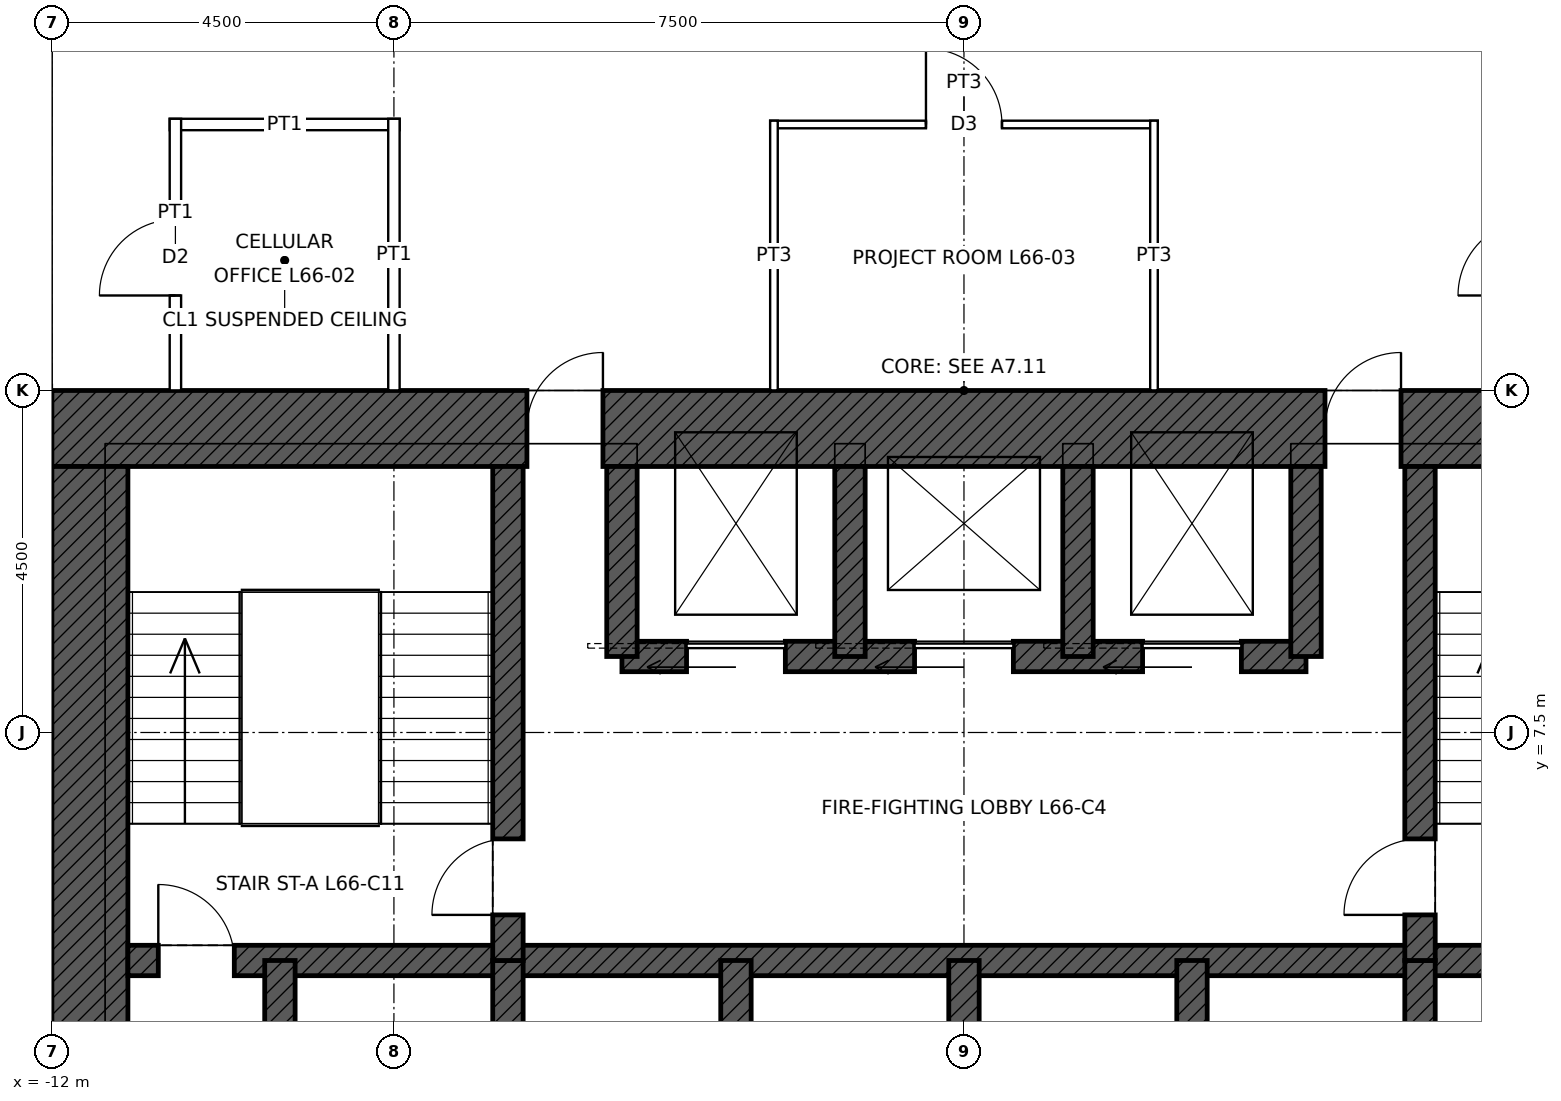
"""IFC4 building model, lengths in metres.
Left out: names, types, materials, properties, quantities, classifications, styles, units other than length and angle.
Written with IfcOpenShell. Run it as: python <this file> out.ifc"""

import sys

from ifc_helpers import new_model, si_unit, direction, frame, frame_2d, origin, place, context, subcontext, project, spatial, rectangle, extrude, element, fill, save


model = new_model("IFC4")
c1 = context("Model", 3, precision=1e-05, world=origin(), true_north=direction((0.0, 1.0)))
c2 = subcontext(c1, "Body", "Model", "MODEL_VIEW")
j1 = project(units=[si_unit("LENGTHUNIT", "METRE"), si_unit("PLANEANGLEUNIT", "RADIAN")], contexts=[c1])
p1 = place(None, origin())
s1 = spatial("IfcSite", under=j1, at=p1, CompositionType="ELEMENT")
p2 = place(p1, origin())
s2 = spatial("IfcBuilding", under=s1, at=p2, CompositionType="ELEMENT")
p3 = place(p2, frame((0.0, 0.0, 299.9)))
s3 = spatial("IfcBuildingStorey", under=s2, at=p3, CompositionType="ELEMENT", Elevation=299.9)
p4 = place(p3, frame((-12.0, 11.5, 0.0), z_axis=(0.0, 0.0, 1.0), x_axis=(1.0, 0.0, 0.0)))
e1 = element("IfcWall", 1, at=p4, inside=s3, PredefinedType="SHEAR", context=c2, shape_type="SweptSolid", body=[
    extrude(rectangle(XDim=24.0, YDim=1.0, at=frame_2d((12.0, 0.0))), origin(), (0.0, 0.0, 1.0), 4.0),
])
p5 = place(p4, frame((6.25, 0.0, 0.0)))
e2 = element("IfcOpeningElement", 2, at=p5, cuts=e1, PredefinedType="OPENING", context=c2, shape_type="SweptSolid", body=[
    extrude(rectangle(XDim=1.0, YDim=2.4, at=frame_2d((0.5, 1.2))), frame((0.0, 0.51, 0.0), z_axis=(0.0, -1.0, 0.0), x_axis=(1.0, 0.0, 0.0)), (0.0, 0.0, 1.0), 1.02),
])
p6 = place(p4, frame((16.75, 0.0, 0.0)))
e3 = element("IfcOpeningElement", 3, at=p6, cuts=e1, PredefinedType="OPENING", context=c2, shape_type="SweptSolid", body=[
    extrude(rectangle(XDim=1.0, YDim=2.4, at=frame_2d((0.5, 1.2))), frame((0.0, 0.51, 0.0), z_axis=(0.0, -1.0, 0.0), x_axis=(1.0, 0.0, 0.0)), (0.0, 0.0, 1.0), 1.02),
])
p7 = place(p3, frame((-11.5, -11.0, 0.0), z_axis=(0.0, 0.0, 1.0), x_axis=(0.0, 1.0, 0.0)))
e4 = element("IfcWall", 4, at=p7, inside=s3, PredefinedType="SHEAR", context=c2, shape_type="SweptSolid", body=[
    extrude(rectangle(XDim=22.0, YDim=1.0, at=frame_2d((11.0, 0.0))), origin(), (0.0, 0.0, 1.0), 4.0),
])
p8 = place(p7, frame((10.5, 0.0, 0.0)))
e5 = element("IfcOpeningElement", 5, at=p8, cuts=e4, PredefinedType="OPENING", context=c2, shape_type="SweptSolid", body=[
    extrude(rectangle(XDim=1.0, YDim=2.4, at=frame_2d((0.5, 1.2))), frame((0.0, 0.51, 0.0), z_axis=(0.0, -1.0, 0.0), x_axis=(1.0, 0.0, 0.0)), (0.0, 0.0, 1.0), 1.02),
])
p9 = place(p3, frame((-11.0, 4.5, 0.0), z_axis=(0.0, 0.0, 1.0), x_axis=(1.0, 0.0, 0.0)))
e6 = element("IfcWall", 6, at=p9, inside=s3, PredefinedType="SHEAR", context=c2, shape_type="SweptSolid", body=[
    extrude(rectangle(XDim=22.0, YDim=0.4, at=frame_2d((11.0, 0.0))), origin(), (0.0, 0.0, 1.0), 4.0),
])
p10 = place(p9, frame((0.4, 0.0, 0.0)))
e7 = element("IfcOpeningElement", 7, at=p10, cuts=e6, PredefinedType="OPENING", context=c2, shape_type="SweptSolid", body=[
    extrude(rectangle(XDim=1.0, YDim=2.1, at=frame_2d((0.5, 1.05))), frame((0.0, 0.21, 0.0), z_axis=(0.0, -1.0, 0.0), x_axis=(1.0, 0.0, 0.0)), (0.0, 0.0, 1.0), 0.42),
])
p11 = place(p9, frame((20.6, 0.0, 0.0)))
e8 = element("IfcOpeningElement", 8, at=p11, cuts=e6, PredefinedType="OPENING", context=c2, shape_type="SweptSolid", body=[
    extrude(rectangle(XDim=1.0, YDim=2.1, at=frame_2d((0.5, 1.05))), frame((0.0, 0.21, 0.0), z_axis=(0.0, -1.0, 0.0), x_axis=(1.0, 0.0, 0.0)), (0.0, 0.0, 1.0), 0.42),
])
p12 = place(p3, frame((-4.5, 8.5, 0.0), z_axis=(0.0, 0.0, 1.0), x_axis=(1.0, 0.0, 0.0)))
e9 = element("IfcWall", 9, at=p12, inside=s3, PredefinedType="SHEAR", context=c2, shape_type="SweptSolid", body=[
    extrude(rectangle(XDim=9.0, YDim=0.4, at=frame_2d((4.5, 0.0))), origin(), (0.0, 0.0, 1.0), 4.0),
])
p13 = place(p12, frame((0.85, 0.0, 0.0)))
e10 = element("IfcOpeningElement", 10, at=p13, cuts=e9, PredefinedType="OPENING", context=c2, shape_type="SweptSolid", body=[
    extrude(rectangle(XDim=1.3, YDim=2.4, at=frame_2d((0.65, 1.2))), frame((0.0, 0.21, 0.0), z_axis=(0.0, -1.0, 0.0), x_axis=(1.0, 0.0, 0.0)), (0.0, 0.0, 1.0), 0.42),
])
p14 = place(p12, frame((6.85, 0.0, 0.0)))
e11 = element("IfcOpeningElement", 11, at=p14, cuts=e9, PredefinedType="OPENING", context=c2, shape_type="SweptSolid", body=[
    extrude(rectangle(XDim=1.3, YDim=2.4, at=frame_2d((0.65, 1.2))), frame((0.0, 0.21, 0.0), z_axis=(0.0, -1.0, 0.0), x_axis=(1.0, 0.0, 0.0)), (0.0, 0.0, 1.0), 0.42),
])
p15 = place(p12, frame((3.85, 0.0, 0.0)))
e12 = element("IfcOpeningElement", 12, at=p15, cuts=e9, PredefinedType="OPENING", context=c2, shape_type="SweptSolid", body=[
    extrude(rectangle(XDim=1.3, YDim=2.4, at=frame_2d((0.65, 1.2))), frame((0.0, 0.21, 0.0), z_axis=(0.0, -1.0, 0.0), x_axis=(1.0, 0.0, 0.0)), (0.0, 0.0, 1.0), 0.42),
])
for number, where, z_axis, x_axis in (
    (13, (-9.0, 1.5, 0.0), (0.0, 0.0, 1.0), (0.0, 1.0, 0.0)),
    (14, (-6.0, 1.5, 0.0), (0.0, 0.0, 1.0), (0.0, 1.0, 0.0)),
    (15, (-3.0, 1.5, 0.0), (0.0, 0.0, 1.0), (0.0, 1.0, 0.0)),
    (16, (0.0, 1.5, 0.0), (0.0, 0.0, 1.0), (0.0, 1.0, 0.0)),
    (17, (3.0, 1.5, 0.0), (0.0, 0.0, 1.0), (0.0, 1.0, 0.0)),
    (18, (6.0, 1.5, 0.0), (0.0, 0.0, 1.0), (0.0, 1.0, 0.0)),
):
    element("IfcWall", number, at=place(p3, frame(where, z_axis=z_axis, x_axis=x_axis)), inside=s3, PredefinedType="SHEAR", context=c2, shape_type="SweptSolid", body=[
        extrude(rectangle(XDim=3.0, YDim=0.4, at=frame_2d((1.5, 0.0))), origin(), (0.0, 0.0, 1.0), 4.0),
    ])
p16 = place(p3, frame((-6.0, 4.5, 0.0), z_axis=(0.0, 0.0, 1.0), x_axis=(0.0, 1.0, 0.0)))
e19 = element("IfcWall", 19, at=p16, inside=s3, PredefinedType="SHEAR", context=c2, shape_type="SweptSolid", body=[
    extrude(rectangle(XDim=6.5, YDim=0.4, at=frame_2d((3.25, 0.0))), origin(), (0.0, 0.0, 1.0), 4.0),
])
p17 = place(p16, frame((0.6, 0.0, 0.0)))
e20 = element("IfcOpeningElement", 20, at=p17, cuts=e19, PredefinedType="OPENING", context=c2, shape_type="SweptSolid", body=[
    extrude(rectangle(XDim=1.0, YDim=2.1, at=frame_2d((0.5, 1.05))), frame((0.0, 0.21, 0.0), z_axis=(0.0, -1.0, 0.0), x_axis=(1.0, 0.0, 0.0)), (0.0, 0.0, 1.0), 0.42),
])
p18 = place(p3, frame((6.0, 4.5, 0.0), z_axis=(0.0, 0.0, 1.0), x_axis=(0.0, 1.0, 0.0)))
e21 = element("IfcWall", 21, at=p18, inside=s3, PredefinedType="SHEAR", context=c2, shape_type="SweptSolid", body=[
    extrude(rectangle(XDim=6.5, YDim=0.4, at=frame_2d((3.25, 0.0))), origin(), (0.0, 0.0, 1.0), 4.0),
])
p19 = place(p18, frame((0.6, 0.0, 0.0)))
e22 = element("IfcOpeningElement", 22, at=p19, cuts=e21, PredefinedType="OPENING", context=c2, shape_type="SweptSolid", body=[
    extrude(rectangle(XDim=1.0, YDim=2.1, at=frame_2d((0.5, 1.05))), frame((0.0, 0.21, 0.0), z_axis=(0.0, -1.0, 0.0), x_axis=(1.0, 0.0, 0.0)), (0.0, 0.0, 1.0), 0.42),
])
for number, where, z_axis, x_axis in (
    (23, (-4.5, 8.5, 0.0), (0.0, 0.0, 1.0), (0.0, 1.0, 0.0)),
    (24, (4.5, 8.5, 0.0), (0.0, 0.0, 1.0), (0.0, 1.0, 0.0)),
    (25, (-1.5, 8.5, 0.0), (0.0, 0.0, 1.0), (0.0, 1.0, 0.0)),
    (26, (1.5, 8.5, 0.0), (0.0, 0.0, 1.0), (0.0, 1.0, 0.0)),
):
    element("IfcWall", number, at=place(p3, frame(where, z_axis=z_axis, x_axis=x_axis)), inside=s3, PredefinedType="SHEAR", context=c2, shape_type="SweptSolid", body=[
        extrude(rectangle(XDim=2.5, YDim=0.4, at=frame_2d((1.25, 0.0))), origin(), (0.0, 0.0, 1.0), 4.0),
    ])
p20 = place(p3, frame((-10.45, 15.5, 0.0), z_axis=(0.0, 0.0, 1.0), x_axis=(1.0, 0.0, 0.0)))
e27 = element("IfcWall", 27, at=p20, inside=s3, PredefinedType="PARTITIONING", context=c2, shape_type="SweptSolid", body=[
    extrude(rectangle(XDim=3.025, YDim=0.15, at=frame_2d((1.512, 0.0))), origin(), (0.0, 0.0, 1.0), 3.85),
])
p21 = place(p3, frame((-2.55, 15.5, 0.0), z_axis=(0.0, 0.0, 1.0), x_axis=(1.0, 0.0, 0.0)))
e28 = element("IfcWall", 28, at=p21, inside=s3, PredefinedType="PARTITIONING", context=c2, shape_type="SweptSolid", body=[
    extrude(rectangle(XDim=5.1, YDim=0.1, at=frame_2d((2.55, 0.0))), origin(), (0.0, 0.0, 1.0), 3.85),
])
p22 = place(p21, frame((2.05, 0.0, 0.0)))
e29 = element("IfcOpeningElement", 29, at=p22, cuts=e28, PredefinedType="OPENING", context=c2, shape_type="SweptSolid", body=[
    extrude(rectangle(XDim=1.0, YDim=2.1, at=frame_2d((0.5, 1.05))), frame((0.0, 0.06, 0.0), z_axis=(0.0, -1.0, 0.0), x_axis=(1.0, 0.0, 0.0)), (0.0, 0.0, 1.0), 0.12),
])
p23 = place(p3, frame((-10.375, 12.0, 0.0), z_axis=(0.0, 0.0, 1.0), x_axis=(0.0, 1.0, 0.0)))
e30 = element("IfcWall", 30, at=p23, inside=s3, PredefinedType="PARTITIONING", context=c2, shape_type="SweptSolid", body=[
    extrude(rectangle(XDim=3.575, YDim=0.15, at=frame_2d((1.788, 0.0))), origin(), (0.0, 0.0, 1.0), 3.85),
])
p24 = place(p23, frame((1.25, 0.0, 0.0)))
e31 = element("IfcOpeningElement", 31, at=p24, cuts=e30, PredefinedType="OPENING", context=c2, shape_type="SweptSolid", body=[
    extrude(rectangle(XDim=1.0, YDim=2.1, at=frame_2d((0.5, 1.05))), frame((0.0, 0.085, 0.0), z_axis=(0.0, -1.0, 0.0), x_axis=(1.0, 0.0, 0.0)), (0.0, 0.0, 1.0), 0.17),
])
p25 = place(p3, frame((-7.5, 12.0, 0.0), z_axis=(0.0, 0.0, 1.0), x_axis=(0.0, 1.0, 0.0)))
e32 = element("IfcWall", 32, at=p25, inside=s3, PredefinedType="PARTITIONING", context=c2, shape_type="SweptSolid", body=[
    extrude(rectangle(XDim=3.575, YDim=0.15, at=frame_2d((1.788, 0.0))), origin(), (0.0, 0.0, 1.0), 3.243),
])
for number, where, z_axis, x_axis in (
    (33, (-2.5, 12.0, 0.0), (0.0, 0.0, 1.0), (0.0, 1.0, 0.0)),
    (34, (2.5, 12.0, 0.0), (0.0, 0.0, 1.0), (0.0, 1.0, 0.0)),
):
    element("IfcWall", number, at=place(p3, frame(where, z_axis=z_axis, x_axis=x_axis)), inside=s3, PredefinedType="PARTITIONING", context=c2, shape_type="SweptSolid", body=[
        extrude(rectangle(XDim=3.55, YDim=0.1, at=frame_2d((1.775, 0.0))), origin(), (0.0, 0.0, 1.0), 3.85),
    ])
p26 = place(p10, origin())
e35 = element("IfcDoor", 35, at=p26, inside=s3, OperationType="SINGLE_SWING_LEFT", PredefinedType="DOOR", context=c2, shape_type="SweptSolid", body=[
    extrude(rectangle(XDim=1.0, YDim=2.1, at=frame_2d((0.5, 1.05))), frame((0.0, 0.025, 0.0), z_axis=(0.0, -1.0, 0.0), x_axis=(1.0, 0.0, 0.0)), (0.0, 0.0, 1.0), 0.05),
])
fill(e7, e35)
p27 = place(p17, origin())
e36 = element("IfcDoor", 36, at=p27, inside=s3, OperationType="SINGLE_SWING_LEFT", PredefinedType="DOOR", context=c2, shape_type="SweptSolid", body=[
    extrude(rectangle(XDim=1.0, YDim=2.1, at=frame_2d((0.5, 1.05))), frame((0.0, 0.025, 0.0), z_axis=(0.0, -1.0, 0.0), x_axis=(1.0, 0.0, 0.0)), (0.0, 0.0, 1.0), 0.05),
])
fill(e20, e36)
p28 = place(p19, origin())
e37 = element("IfcDoor", 37, at=p28, inside=s3, OperationType="SINGLE_SWING_LEFT", PredefinedType="DOOR", context=c2, shape_type="SweptSolid", body=[
    extrude(rectangle(XDim=1.0, YDim=2.1, at=frame_2d((0.5, 1.05))), frame((0.0, 0.025, 0.0), z_axis=(0.0, -1.0, 0.0), x_axis=(1.0, 0.0, 0.0)), (0.0, 0.0, 1.0), 0.05),
])
fill(e22, e37)
p29 = place(p5, origin())
e38 = element("IfcDoor", 38, at=p29, inside=s3, OperationType="SINGLE_SWING_RIGHT", PredefinedType="DOOR", context=c2, shape_type="SweptSolid", body=[
    extrude(rectangle(XDim=1.0, YDim=2.4, at=frame_2d((0.5, 1.2))), frame((0.0, 0.485, 0.0), z_axis=(0.0, -1.0, 0.0), x_axis=(1.0, 0.0, 0.0)), (0.0, 0.0, 1.0), 0.05),
])
fill(e2, e38)
p30 = place(p6, origin())
e39 = element("IfcDoor", 39, at=p30, inside=s3, OperationType="SINGLE_SWING_RIGHT", PredefinedType="DOOR", context=c2, shape_type="SweptSolid", body=[
    extrude(rectangle(XDim=1.0, YDim=2.4, at=frame_2d((0.5, 1.2))), frame((0.0, 0.485, 0.0), z_axis=(0.0, -1.0, 0.0), x_axis=(1.0, 0.0, 0.0)), (0.0, 0.0, 1.0), 0.05),
])
fill(e3, e39)
p31 = place(p13, origin())
e40 = element("IfcDoor", 40, at=p31, inside=s3, OperationType="SLIDING_TO_LEFT", PredefinedType="DOOR", context=c2, shape_type="SweptSolid", body=[
    extrude(rectangle(XDim=1.3, YDim=2.4, at=frame_2d((0.65, 1.2))), frame((0.0, 0.025, 0.0), z_axis=(0.0, -1.0, 0.0), x_axis=(1.0, 0.0, 0.0)), (0.0, 0.0, 1.0), 0.05),
])
fill(e10, e40)
p32 = place(p14, origin())
e41 = element("IfcDoor", 41, at=p32, inside=s3, OperationType="SLIDING_TO_LEFT", PredefinedType="DOOR", context=c2, shape_type="SweptSolid", body=[
    extrude(rectangle(XDim=1.3, YDim=2.4, at=frame_2d((0.65, 1.2))), frame((0.0, 0.025, 0.0), z_axis=(0.0, -1.0, 0.0), x_axis=(1.0, 0.0, 0.0)), (0.0, 0.0, 1.0), 0.05),
])
fill(e11, e41)
p33 = place(p15, origin())
e42 = element("IfcDoor", 42, at=p33, inside=s3, OperationType="SLIDING_TO_LEFT", PredefinedType="DOOR", context=c2, shape_type="SweptSolid", body=[
    extrude(rectangle(XDim=1.3, YDim=2.4, at=frame_2d((0.65, 1.2))), frame((0.0, 0.025, 0.0), z_axis=(0.0, -1.0, 0.0), x_axis=(1.0, 0.0, 0.0)), (0.0, 0.0, 1.0), 0.05),
])
fill(e12, e42)
p34 = place(p24, origin())
e43 = element("IfcDoor", 43, at=p34, inside=s3, OperationType="SINGLE_SWING_LEFT", PredefinedType="DOOR", context=c2, shape_type="SweptSolid", body=[
    extrude(rectangle(XDim=1.0, YDim=2.1, at=frame_2d((0.5, 1.05))), frame((0.0, 0.025, 0.0), z_axis=(0.0, -1.0, 0.0), x_axis=(1.0, 0.0, 0.0)), (0.0, 0.0, 1.0), 0.05),
])
fill(e31, e43)
p35 = place(p22, origin())
e44 = element("IfcDoor", 44, at=p35, inside=s3, OperationType="SINGLE_SWING_LEFT", PredefinedType="DOOR", context=c2, shape_type="SweptSolid", body=[
    extrude(rectangle(XDim=1.0, YDim=2.1, at=frame_2d((0.5, 1.05))), frame((0.0, 0.025, 0.0), z_axis=(0.0, -1.0, 0.0), x_axis=(1.0, 0.0, 0.0)), (0.0, 0.0, 1.0), 0.05),
])
fill(e29, e44)
save(model, sys.argv[1])
